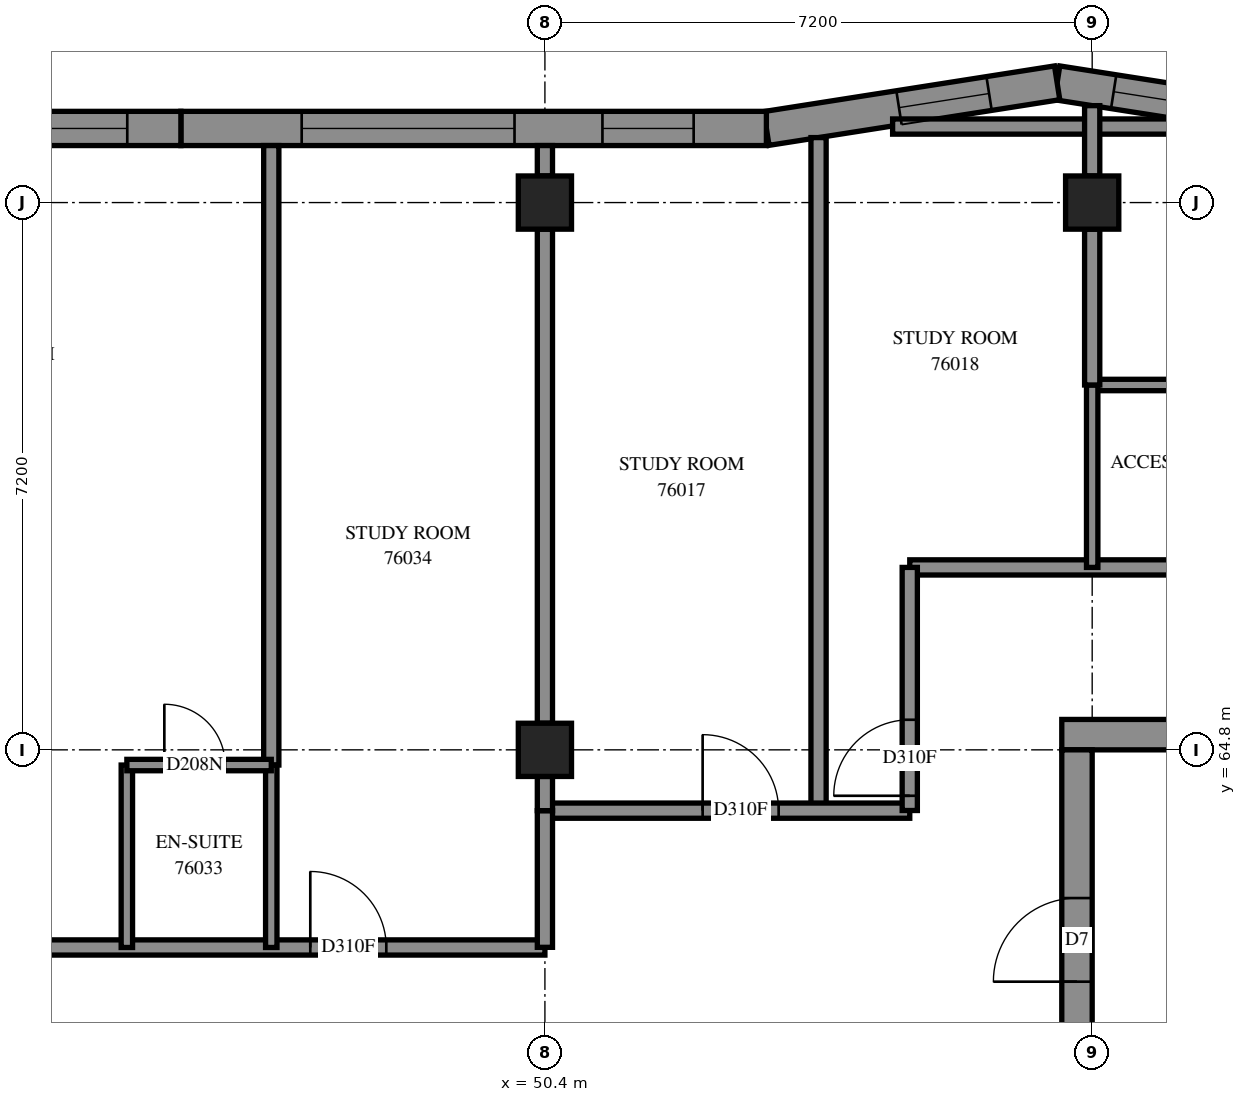
"""IFC4 building model, lengths in metres.
Left out: names, types, materials, properties, quantities, classifications, styles, units other than length and angle.
Written with IfcOpenShell. Run it as: python <this file> out.ifc"""

import sys

from ifc_helpers import new_model, si_unit, direction, frame, frame_2d, origin, origin_2d, place, context, subcontext, project, spatial, polyline, rectangle, outline, extrude, element, fill, save


model = new_model("IFC4")
c1 = context("Model", 3, precision=1e-05, world=origin(), true_north=direction((0.0, 1.0)))
c2 = subcontext(c1, "Body", "Model", "MODEL_VIEW")
j1 = project(units=[si_unit("LENGTHUNIT", "METRE"), si_unit("PLANEANGLEUNIT", "RADIAN")], contexts=[c1])
p1 = place(None, origin())
s1 = spatial("IfcSite", under=j1, at=p1, CompositionType="ELEMENT")
p2 = place(p1, origin())
s2 = spatial("IfcBuilding", under=s1, at=p2, CompositionType="ELEMENT")
p3 = place(p2, frame((0.0, 0.0, 277.8)))
s3 = spatial("IfcBuildingStorey", under=s2, at=p3, CompositionType="ELEMENT", Elevation=277.8)
for number, where, z_axis, x_axis in (
    (1, (50.4, 64.8, 0.0), (0.0, 0.0, 1.0), (1.0, 0.0, 0.0)),
    (2, (50.4, 72.0, 0.0), (0.0, 0.0, 1.0), (1.0, 0.0, 0.0)),
    (3, (57.6, 72.0, 0.0), (0.0, 0.0, 1.0), (1.0, 0.0, 0.0)),
):
    element("IfcColumn", number, at=place(p3, frame(where, z_axis=z_axis, x_axis=x_axis)), inside=s3, PredefinedType="COLUMN", context=c2, shape_type="SweptSolid", body=[
        extrude(rectangle(XDim=0.7, YDim=0.7, at=origin_2d()), origin(), (0.0, 0.0, 1.0), 3.1),
    ])
p4 = place(p3, frame((57.2, 65.0, -0.3), z_axis=(0.0, 0.0, 1.0), x_axis=(1.0, 0.0, 0.0)))
e4 = element("IfcWall", 4, at=p4, inside=s3, PredefinedType="SHEAR", context=c2, shape_type="SweptSolid", body=[
    extrude(rectangle(XDim=15.2, YDim=0.4, at=frame_2d((7.6, 0.0))), origin(), (0.0, 0.0, 1.0), 2.7),
])
p5 = place(p4, frame((10.4, 0.0, 0.3)))
e5 = element("IfcOpeningElement", 5, at=p5, cuts=e4, PredefinedType="OPENING", context=c2, shape_type="SweptSolid", body=[
    extrude(rectangle(XDim=0.8, YDim=2.1, at=frame_2d((0.4, 1.05))), frame((0.0, 0.21, 0.0), z_axis=(0.0, -1.0, 0.0), x_axis=(1.0, 0.0, 0.0)), (0.0, 0.0, 1.0), 0.42),
])
p6 = place(p3, frame((57.4, 50.4, -0.3), z_axis=(0.0, 0.0, 1.0), x_axis=(0.0, 1.0, 0.0)))
e6 = element("IfcWall", 6, at=p6, inside=s3, PredefinedType="SHEAR", context=c2, shape_type="SweptSolid", body=[
    extrude(rectangle(XDim=14.4, YDim=0.4, at=frame_2d((7.2, 0.0))), origin(), (0.0, 0.0, 1.0), 2.7),
])
p7 = place(p6, frame((4.55, 0.0, 0.3)))
e7 = element("IfcOpeningElement", 7, at=p7, cuts=e6, PredefinedType="OPENING", context=c2, shape_type="SweptSolid", body=[
    extrude(rectangle(XDim=1.1, YDim=2.1, at=frame_2d((0.55, 1.05))), frame((0.0, 0.21, 0.0), z_axis=(0.0, -1.0, 0.0), x_axis=(1.0, 0.0, 0.0)), (0.0, 0.0, 1.0), 0.42),
])
p8 = place(p6, frame((11.35, 0.0, 0.3)))
e8 = element("IfcOpeningElement", 8, at=p8, cuts=e6, PredefinedType="OPENING", context=c2, shape_type="SweptSolid", body=[
    extrude(rectangle(XDim=1.1, YDim=2.1, at=frame_2d((0.55, 1.05))), frame((0.0, 0.21, 0.0), z_axis=(0.0, -1.0, 0.0), x_axis=(1.0, 0.0, 0.0)), (0.0, 0.0, 1.0), 0.42),
])
p9 = place(p3, frame((60.982, 72.972, 0.0), z_axis=(0.0, 0.0, 1.0), x_axis=(-0.9879113447, 0.155019918, 0.0)))
e9 = element("IfcWall", 9, at=p9, inside=s3, PredefinedType="SOLIDWALL", context=c2, shape_type="SweptSolid", body=[
    extrude(outline(polyline([(0.035, -0.225), (3.925, -0.225), (3.854, 0.225), (-0.035, 0.225), (0.035, -0.225)])), origin(), (0.0, 0.0, 1.0), 3.1),
])
p10 = place(p9, frame((0.487, 0.0, 0.45)))
e10 = element("IfcOpeningElement", 10, at=p10, cuts=e9, PredefinedType="OPENING", context=c2, shape_type="SweptSolid", body=[
    extrude(rectangle(XDim=1.0, YDim=2.5, at=frame_2d((0.5, 1.25))), frame((0.0, 0.235, 0.0), z_axis=(0.0, -1.0, 0.0), x_axis=(1.0, 0.0, 0.0)), (0.0, 0.0, 1.0), 0.47),
])
p11 = place(p9, frame((1.837, 0.0, 0.45)))
e11 = element("IfcOpeningElement", 11, at=p11, cuts=e9, PredefinedType="OPENING", context=c2, shape_type="SweptSolid", body=[
    extrude(rectangle(XDim=1.3, YDim=2.5, at=frame_2d((0.65, 1.25))), frame((0.0, 0.235, 0.0), z_axis=(0.0, -1.0, 0.0), x_axis=(1.0, 0.0, 0.0)), (0.0, 0.0, 1.0), 0.47),
])
p12 = place(p3, frame((57.139, 73.575, 0.0), z_axis=(0.0, 0.0, 1.0), x_axis=(-0.9879128581, -0.1550102733, 0.0)))
e12 = element("IfcWall", 12, at=p12, inside=s3, PredefinedType="SOLIDWALL", context=c2, shape_type="SweptSolid", body=[
    extrude(outline(polyline([(-0.035, -0.225), (3.854, -0.225), (3.89, 0.225), (0.035, 0.225), (-0.035, -0.225)])), origin(), (0.0, 0.0, 1.0), 3.1),
])
p13 = place(p12, frame((0.906, 0.0, 0.45)))
e13 = element("IfcOpeningElement", 13, at=p13, cuts=e12, PredefinedType="OPENING", context=c2, shape_type="SweptSolid", body=[
    extrude(rectangle(XDim=1.2, YDim=2.55, at=frame_2d((0.6, 1.275))), frame((0.0, 0.235, 0.0), z_axis=(0.0, -1.0, 0.0), x_axis=(1.0, 0.0, 0.0)), (0.0, 0.0, 1.0), 0.47),
])
p14 = place(p3, frame((53.314, 72.975, 0.0), z_axis=(0.0, 0.0, 1.0), x_axis=(-1.0, 0.0, 0.0)))
e14 = element("IfcWall", 14, at=p14, inside=s3, PredefinedType="SOLIDWALL", context=c2, shape_type="SweptSolid", body=[
    extrude(outline(polyline([(0.018, -0.225), (7.703, -0.225), (7.703, 0.225), (-0.018, 0.225), (0.018, -0.225)])), origin(), (0.0, 0.0, 1.0), 3.1),
])
p15 = place(p14, frame((3.314, 0.0, 0.45)))
e15 = element("IfcOpeningElement", 15, at=p15, cuts=e14, PredefinedType="OPENING", context=c2, shape_type="SweptSolid", body=[
    extrude(rectangle(XDim=2.8, YDim=2.55, at=frame_2d((1.4, 1.275))), frame((0.0, 0.235, 0.0), z_axis=(0.0, -1.0, 0.0), x_axis=(1.0, 0.0, 0.0)), (0.0, 0.0, 1.0), 0.47),
])
p16 = place(p14, frame((0.957, 0.0, 0.45)))
e16 = element("IfcOpeningElement", 16, at=p16, cuts=e14, PredefinedType="OPENING", context=c2, shape_type="SweptSolid", body=[
    extrude(rectangle(XDim=1.2, YDim=2.55, at=frame_2d((0.6, 1.275))), frame((0.0, 0.235, 0.0), z_axis=(0.0, -1.0, 0.0), x_axis=(1.0, 0.0, 0.0)), (0.0, 0.0, 1.0), 0.47),
])
p17 = place(p3, frame((45.611, 72.975, 0.0), z_axis=(0.0, 0.0, 1.0), x_axis=(-1.0, 0.0, 0.0)))
e17 = element("IfcWall", 17, at=p17, inside=s3, PredefinedType="SOLIDWALL", context=c2, shape_type="SweptSolid", body=[
    extrude(outline(polyline([(0.0, -0.225), (7.686, -0.225), (7.721, 0.225), (0.0, 0.225), (0.0, -0.225)])), origin(), (0.0, 0.0, 1.0), 3.1),
])
p18 = place(p17, frame((2.811, 0.0, 0.45)))
e18 = element("IfcOpeningElement", 18, at=p18, cuts=e17, PredefinedType="OPENING", context=c2, shape_type="SweptSolid", body=[
    extrude(rectangle(XDim=2.8, YDim=2.55, at=frame_2d((1.4, 1.275))), frame((0.0, 0.235, 0.0), z_axis=(0.0, -1.0, 0.0), x_axis=(1.0, 0.0, 0.0)), (0.0, 0.0, 1.0), 0.47),
])
p19 = place(p17, frame((0.705, 0.0, 0.45)))
e19 = element("IfcOpeningElement", 19, at=p19, cuts=e17, PredefinedType="OPENING", context=c2, shape_type="SweptSolid", body=[
    extrude(rectangle(XDim=1.2, YDim=2.55, at=frame_2d((0.6, 1.275))), frame((0.0, 0.235, 0.0), z_axis=(0.0, -1.0, 0.0), x_axis=(1.0, 0.0, 0.0)), (0.0, 0.0, 1.0), 0.47),
])
p20 = place(p17, frame((6.157, 0.0, 0.45)))
e20 = element("IfcOpeningElement", 20, at=p20, cuts=e17, PredefinedType="OPENING", context=c2, shape_type="SweptSolid", body=[
    extrude(rectangle(XDim=1.2, YDim=2.55, at=frame_2d((0.6, 1.275))), frame((0.0, 0.235, 0.0), z_axis=(0.0, -1.0, 0.0), x_axis=(1.0, 0.0, 0.0)), (0.0, 0.0, 1.0), 0.47),
])
p21 = place(p3, frame((55.2, 67.2, 0.0), z_axis=(0.0, 0.0, 1.0), x_axis=(1.0, 0.0, 0.0)))
e21 = element("IfcWall", 21, at=p21, inside=s3, PredefinedType="PARTITIONING", context=c2, shape_type="SweptSolid", body=[
    extrude(rectangle(XDim=19.2, YDim=0.2, at=frame_2d((9.6, 0.0))), origin(), (0.0, 0.0, 1.0), 3.1),
])
p22 = place(p21, frame((6.261, 0.0, 0.0)))
e22 = element("IfcOpeningElement", 22, at=p22, cuts=e21, PredefinedType="OPENING", context=c2, shape_type="SweptSolid", body=[
    extrude(rectangle(XDim=0.9, YDim=2.1, at=frame_2d((0.45, 1.05))), frame((0.0, 0.11, 0.0), z_axis=(0.0, -1.0, 0.0), x_axis=(1.0, 0.0, 0.0)), (0.0, 0.0, 1.0), 0.22),
])
p23 = place(p21, frame((11.675, 0.0, 0.0)))
e23 = element("IfcOpeningElement", 23, at=p23, cuts=e21, PredefinedType="OPENING", context=c2, shape_type="SweptSolid", body=[
    extrude(rectangle(XDim=1.0, YDim=2.1, at=frame_2d((0.5, 1.05))), frame((0.0, 0.11, 0.0), z_axis=(0.0, -1.0, 0.0), x_axis=(1.0, 0.0, 0.0)), (0.0, 0.0, 1.0), 0.22),
])
p24 = place(p21, frame((13.88, 0.0, 0.0)))
e24 = element("IfcOpeningElement", 24, at=p24, cuts=e21, PredefinedType="OPENING", context=c2, shape_type="SweptSolid", body=[
    extrude(rectangle(XDim=1.0, YDim=2.1, at=frame_2d((0.5, 1.05))), frame((0.0, 0.11, 0.0), z_axis=(0.0, -1.0, 0.0), x_axis=(1.0, 0.0, 0.0)), (0.0, 0.0, 1.0), 0.22),
])
p25 = place(p3, frame((40.602, 62.2, 0.0), z_axis=(0.0, 0.0, 1.0), x_axis=(1.0, 0.0, 0.0)))
e25 = element("IfcWall", 25, at=p25, inside=s3, PredefinedType="PARTITIONING", context=c2, shape_type="SweptSolid", body=[
    extrude(rectangle(XDim=9.798, YDim=0.2, at=frame_2d((4.899, 0.0))), origin(), (0.0, 0.0, 1.0), 3.1),
])
p26 = place(p25, frame((1.306, 0.0, 0.0)))
e26 = element("IfcOpeningElement", 26, at=p26, cuts=e25, PredefinedType="OPENING", context=c2, shape_type="SweptSolid", body=[
    extrude(rectangle(XDim=0.9, YDim=2.1, at=frame_2d((0.45, 1.05))), frame((0.0, 0.11, 0.0), z_axis=(0.0, -1.0, 0.0), x_axis=(1.0, 0.0, 0.0)), (0.0, 0.0, 1.0), 0.22),
])
p27 = place(p25, frame((6.711, 0.0, 0.0)))
e27 = element("IfcOpeningElement", 27, at=p27, cuts=e25, PredefinedType="OPENING", context=c2, shape_type="SweptSolid", body=[
    extrude(rectangle(XDim=1.0, YDim=2.1, at=frame_2d((0.5, 1.05))), frame((0.0, 0.11, 0.0), z_axis=(0.0, -1.0, 0.0), x_axis=(1.0, 0.0, 0.0)), (0.0, 0.0, 1.0), 0.22),
])
p28 = place(p3, frame((54.0, 64.0, 0.0), z_axis=(0.0, 0.0, 1.0), x_axis=(0.0, 1.0, 0.0)))
e28 = element("IfcWall", 28, at=p28, inside=s3, PredefinedType="PARTITIONING", context=c2, shape_type="SweptSolid", body=[
    extrude(rectangle(XDim=8.855, YDim=0.2, at=frame_2d((4.428, 0.0))), origin(), (0.0, 0.0, 1.0), 3.1),
])
p29 = place(p3, frame((46.8, 64.6, 0.0), z_axis=(0.0, 0.0, 1.0), x_axis=(0.0, 1.0, 0.0)))
e29 = element("IfcWall", 29, at=p29, inside=s3, PredefinedType="PARTITIONING", context=c2, shape_type="SweptSolid", body=[
    extrude(rectangle(XDim=8.15, YDim=0.2, at=frame_2d((4.075, 0.0))), origin(), (0.0, 0.0, 1.0), 3.1),
])
p30 = place(p3, frame((50.4, 65.15, 0.0), z_axis=(0.0, 0.0, 1.0), x_axis=(0.0, 1.0, 0.0)))
e30 = element("IfcWall", 30, at=p30, inside=s3, PredefinedType="PARTITIONING", context=c2, shape_type="SweptSolid", body=[
    extrude(rectangle(XDim=6.5, YDim=0.2, at=frame_2d((3.25, 0.0))), origin(), (0.0, 0.0, 1.0), 3.1),
])
p31 = place(p3, frame((50.4, 64.0, 0.0), z_axis=(0.0, 0.0, 1.0), x_axis=(1.0, 0.0, 0.0)))
e31 = element("IfcWall", 31, at=p31, inside=s3, PredefinedType="PARTITIONING", context=c2, shape_type="SweptSolid", body=[
    extrude(rectangle(XDim=4.8, YDim=0.2, at=frame_2d((2.4, 0.0))), origin(), (0.0, 0.0, 1.0), 3.1),
])
p32 = place(p31, frame((2.075, 0.0, 0.0)))
e32 = element("IfcOpeningElement", 32, at=p32, cuts=e31, PredefinedType="OPENING", context=c2, shape_type="SweptSolid", body=[
    extrude(rectangle(XDim=1.0, YDim=2.1, at=frame_2d((0.5, 1.05))), frame((0.0, 0.11, 0.0), z_axis=(0.0, -1.0, 0.0), x_axis=(1.0, 0.0, 0.0)), (0.0, 0.0, 1.0), 0.22),
])
p33 = place(p3, frame((54.974, 73.0, 0.0), z_axis=(0.0, 0.0, 1.0), x_axis=(1.0, 0.0, 0.0)))
e33 = element("IfcWall", 33, at=p33, inside=s3, PredefinedType="PARTITIONING", context=c2, shape_type="SweptSolid", body=[
    extrude(rectangle(XDim=4.329, YDim=0.2, at=frame_2d((2.164, 0.0))), origin(), (0.0, 0.0, 1.0), 3.1),
])
p34 = place(p3, frame((57.6, 69.6, 0.0), z_axis=(0.0, 0.0, 1.0), x_axis=(1.0, 0.0, 0.0)))
e34 = element("IfcWall", 34, at=p34, inside=s3, PredefinedType="PARTITIONING", context=c2, shape_type="SweptSolid", body=[
    extrude(rectangle(XDim=3.2, YDim=0.15, at=frame_2d((1.6, 0.0))), origin(), (0.0, 0.0, 1.0), 3.1),
])
p35 = place(p34, frame((1.196, 0.0, 0.0)))
e35 = element("IfcOpeningElement", 35, at=p35, cuts=e34, PredefinedType="OPENING", context=c2, shape_type="SweptSolid", body=[
    extrude(rectangle(XDim=0.8, YDim=2.1, at=frame_2d((0.4, 1.05))), frame((0.0, 0.085, 0.0), z_axis=(0.0, -1.0, 0.0), x_axis=(1.0, 0.0, 0.0)), (0.0, 0.0, 1.0), 0.17),
])
p36 = place(p3, frame((55.2, 64.002, 0.0), z_axis=(0.0, 0.0, 1.0), x_axis=(0.0, 1.0, 0.0)))
e36 = element("IfcWall", 36, at=p36, inside=s3, PredefinedType="PARTITIONING", context=c2, shape_type="SweptSolid", body=[
    extrude(rectangle(XDim=3.198, YDim=0.2, at=frame_2d((1.599, 0.0))), origin(), (0.0, 0.0, 1.0), 3.1),
])
p37 = place(p36, frame((0.194, 0.0, 0.0)))
e37 = element("IfcOpeningElement", 37, at=p37, cuts=e36, PredefinedType="OPENING", context=c2, shape_type="SweptSolid", body=[
    extrude(rectangle(XDim=1.0, YDim=2.1, at=frame_2d((0.5, 1.05))), frame((0.0, 0.11, 0.0), z_axis=(0.0, -1.0, 0.0), x_axis=(1.0, 0.0, 0.0)), (0.0, 0.0, 1.0), 0.22),
])
for number, where, z_axis, x_axis in (
    (38, (44.9, 62.2, 0.0), (0.0, 0.0, 1.0), (0.0, 1.0, 0.0)),
    (39, (46.8, 62.2, 0.0), (0.0, 0.0, 1.0), (0.0, 1.0, 0.0)),
    (40, (57.6, 67.2, 0.0), (0.0, 0.0, 1.0), (0.0, 1.0, 0.0)),
):
    element("IfcWall", number, at=place(p3, frame(where, z_axis=z_axis, x_axis=x_axis)), inside=s3, PredefinedType="PARTITIONING", context=c2, shape_type="SweptSolid", body=[
        extrude(rectangle(XDim=2.4, YDim=0.15, at=frame_2d((1.2, 0.0))), origin(), (0.0, 0.0, 1.0), 3.1),
    ])
p38 = place(p3, frame((57.6, 69.6, 0.0), z_axis=(0.0, 0.0, 1.0), x_axis=(0.0, 1.0, 0.0)))
e41 = element("IfcWall", 41, at=p38, inside=s3, PredefinedType="PARTITIONING", context=c2, shape_type="SweptSolid", body=[
    extrude(rectangle(XDim=2.05, YDim=0.2, at=frame_2d((1.025, 0.0))), origin(), (0.0, 0.0, 1.0), 3.1),
])
p39 = place(p3, frame((44.9, 64.6, 0.0), z_axis=(0.0, 0.0, 1.0), x_axis=(1.0, 0.0, 0.0)))
e42 = element("IfcWall", 42, at=p39, inside=s3, PredefinedType="PARTITIONING", context=c2, shape_type="SweptSolid", body=[
    extrude(rectangle(XDim=1.9, YDim=0.15, at=frame_2d((0.95, 0.0))), origin(), (0.0, 0.0, 1.0), 3.1),
])
p40 = place(p39, frame((0.493, 0.0, 0.0)))
e43 = element("IfcOpeningElement", 43, at=p40, cuts=e42, PredefinedType="OPENING", context=c2, shape_type="SweptSolid", body=[
    extrude(rectangle(XDim=0.8, YDim=2.1, at=frame_2d((0.4, 1.05))), frame((0.0, 0.085, 0.0), z_axis=(0.0, -1.0, 0.0), x_axis=(1.0, 0.0, 0.0)), (0.0, 0.0, 1.0), 0.17),
])
p41 = place(p3, frame((50.4, 62.202, 0.0), z_axis=(0.0, 0.0, 1.0), x_axis=(0.0, 1.0, 0.0)))
e44 = element("IfcWall", 44, at=p41, inside=s3, PredefinedType="PARTITIONING", context=c2, shape_type="SweptSolid", body=[
    extrude(rectangle(XDim=1.798, YDim=0.2, at=frame_2d((0.899, 0.0))), origin(), (0.0, 0.0, 1.0), 3.1),
])
p42 = place(p3, frame((57.6, 72.35, 0.0), z_axis=(0.0, 0.0, 1.0), x_axis=(0.0, 1.0, 0.0)))
e45 = element("IfcWall", 45, at=p42, inside=s3, PredefinedType="PARTITIONING", context=c2, shape_type="SweptSolid", body=[
    extrude(rectangle(XDim=0.925, YDim=0.2, at=frame_2d((0.463, 0.0))), origin(), (0.0, 0.0, 1.0), 3.1),
])
p43 = place(p3, frame((50.4, 64.0, 0.0), z_axis=(0.0, 0.0, 1.0), x_axis=(0.0, 1.0, 0.0)))
e46 = element("IfcWall", 46, at=p43, inside=s3, PredefinedType="PARTITIONING", context=c2, shape_type="SweptSolid", body=[
    extrude(rectangle(XDim=0.45, YDim=0.2, at=frame_2d((0.225, 0.0))), origin(), (0.0, 0.0, 1.0), 3.1),
])
p44 = place(p3, frame((50.4, 72.35, 0.0), z_axis=(0.0, 0.0, 1.0), x_axis=(0.0, 1.0, 0.0)))
e47 = element("IfcWall", 47, at=p44, inside=s3, PredefinedType="PARTITIONING", context=c2, shape_type="SweptSolid", body=[
    extrude(rectangle(XDim=0.4, YDim=0.2, at=frame_2d((0.2, 0.0))), origin(), (0.0, 0.0, 1.0), 3.1),
])
p45 = place(p13, origin())
e48 = element("IfcWindow", 48, at=p45, inside=s3, PartitioningType="SINGLE_PANEL", PredefinedType="WINDOW", context=c2, shape_type="SweptSolid", body=[
    extrude(rectangle(XDim=1.2, YDim=2.55, at=frame_2d((0.6, 1.275))), frame((0.0, 0.115, 0.0), z_axis=(0.0, -1.0, 0.0), x_axis=(1.0, 0.0, 0.0)), (0.0, 0.0, 1.0), 0.06),
])
fill(e13, e48)
p46 = place(p15, origin())
e49 = element("IfcWindow", 49, at=p46, inside=s3, PartitioningType="SINGLE_PANEL", PredefinedType="WINDOW", context=c2, shape_type="SweptSolid", body=[
    extrude(rectangle(XDim=2.8, YDim=2.55, at=frame_2d((1.4, 1.275))), frame((0.0, 0.205, 0.0), z_axis=(0.0, -1.0, 0.0), x_axis=(1.0, 0.0, 0.0)), (0.0, 0.0, 1.0), 0.06),
])
fill(e15, e49)
p47 = place(p16, origin())
e50 = element("IfcWindow", 50, at=p47, inside=s3, PartitioningType="SINGLE_PANEL", PredefinedType="WINDOW", context=c2, shape_type="SweptSolid", body=[
    extrude(rectangle(XDim=1.2, YDim=2.55, at=frame_2d((0.6, 1.275))), frame((0.0, 0.205, 0.0), z_axis=(0.0, -1.0, 0.0), x_axis=(1.0, 0.0, 0.0)), (0.0, 0.0, 1.0), 0.06),
])
fill(e16, e50)
p48 = place(p19, origin())
e51 = element("IfcWindow", 51, at=p48, inside=s3, PartitioningType="SINGLE_PANEL", PredefinedType="WINDOW", context=c2, shape_type="SweptSolid", body=[
    extrude(rectangle(XDim=1.2, YDim=2.55, at=frame_2d((0.6, 1.275))), frame((0.0, 0.205, 0.0), z_axis=(0.0, -1.0, 0.0), x_axis=(1.0, 0.0, 0.0)), (0.0, 0.0, 1.0), 0.06),
])
fill(e19, e51)
p49 = place(p8, origin())
e52 = element("IfcDoor", 52, at=p49, inside=s3, OperationType="SINGLE_SWING_LEFT", PredefinedType="DOOR", context=c2, shape_type="SweptSolid", body=[
    extrude(rectangle(XDim=1.1, YDim=2.1, at=frame_2d((0.55, 1.05))), frame((0.0, 0.025, 0.0), z_axis=(0.0, -1.0, 0.0), x_axis=(1.0, 0.0, 0.0)), (0.0, 0.0, 1.0), 0.05),
])
fill(e8, e52)
p50 = place(p32, origin())
e53 = element("IfcDoor", 53, at=p50, inside=s3, OperationType="SINGLE_SWING_RIGHT", PredefinedType="DOOR", context=c2, shape_type="SweptSolid", body=[
    extrude(rectangle(XDim=1.0, YDim=2.1, at=frame_2d((0.5, 1.05))), frame((0.0, 0.025, 0.0), z_axis=(0.0, -1.0, 0.0), x_axis=(1.0, 0.0, 0.0)), (0.0, 0.0, 1.0), 0.05),
])
fill(e32, e53)
p51 = place(p37, origin())
e54 = element("IfcDoor", 54, at=p51, inside=s3, OperationType="SINGLE_SWING_LEFT", PredefinedType="DOOR", context=c2, shape_type="SweptSolid", body=[
    extrude(rectangle(XDim=1.0, YDim=2.1, at=frame_2d((0.5, 1.05))), frame((0.0, 0.025, 0.0), z_axis=(0.0, -1.0, 0.0), x_axis=(1.0, 0.0, 0.0)), (0.0, 0.0, 1.0), 0.05),
])
fill(e37, e54)
p52 = place(p40, origin())
e55 = element("IfcDoor", 55, at=p52, inside=s3, OperationType="SINGLE_SWING_RIGHT", PredefinedType="DOOR", context=c2, shape_type="SweptSolid", body=[
    extrude(rectangle(XDim=0.8, YDim=2.1, at=frame_2d((0.4, 1.05))), frame((0.0, 0.025, 0.0), z_axis=(0.0, -1.0, 0.0), x_axis=(1.0, 0.0, 0.0)), (0.0, 0.0, 1.0), 0.05),
])
fill(e43, e55)
p53 = place(p27, origin())
e56 = element("IfcDoor", 56, at=p53, inside=s3, OperationType="SINGLE_SWING_LEFT", PredefinedType="DOOR", context=c2, shape_type="SweptSolid", body=[
    extrude(rectangle(XDim=1.0, YDim=2.1, at=frame_2d((0.5, 1.05))), frame((0.0, 0.025, 0.0), z_axis=(0.0, -1.0, 0.0), x_axis=(1.0, 0.0, 0.0)), (0.0, 0.0, 1.0), 0.05),
])
fill(e27, e56)
p54 = place(p11, origin())
e57 = element("IfcWindow", 57, at=p54, inside=s3, PartitioningType="SINGLE_PANEL", PredefinedType="WINDOW", context=c2, shape_type="SweptSolid", body=[
    extrude(rectangle(XDim=1.3, YDim=2.5, at=frame_2d((0.65, 1.25))), frame((0.0, 0.125, 0.0), z_axis=(0.0, -1.0, 0.0), x_axis=(1.0, 0.0, 0.0)), (0.0, 0.0, 1.0), 0.06),
])
fill(e11, e57)
save(model, sys.argv[1])
